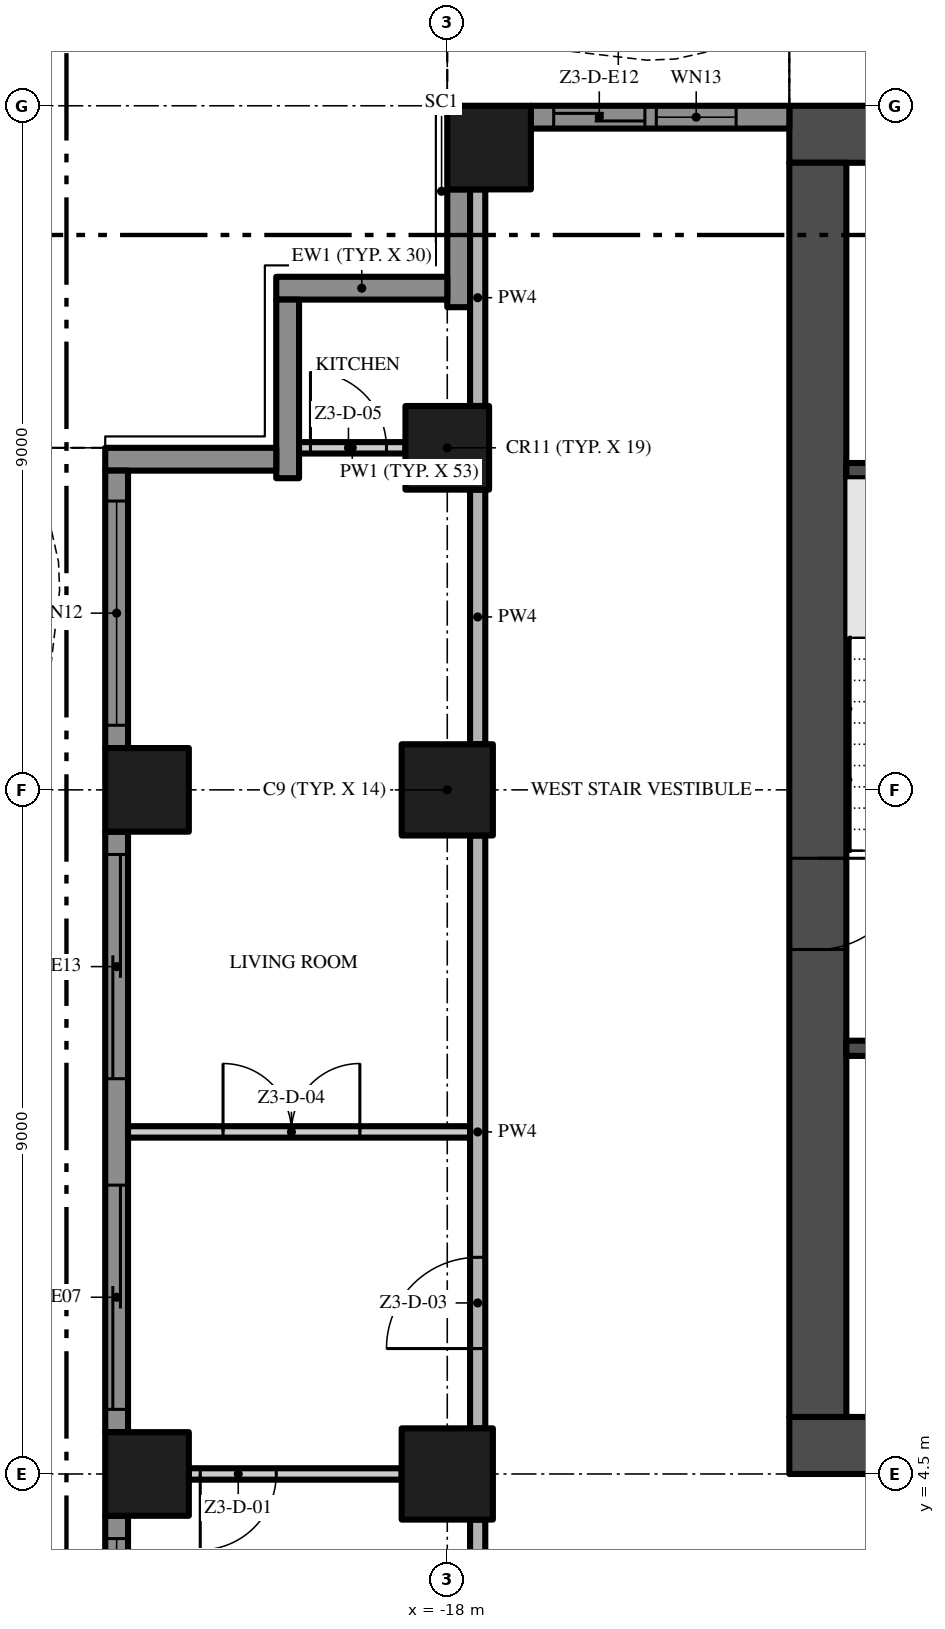
"""IFC4 building model, lengths in metres.
Left out: names, types, materials, properties, quantities, classifications, styles, units other than length and angle.
Written with IfcOpenShell. Run it as: python <this file> out.ifc"""

import sys

from ifc_helpers import new_model, si_unit, direction, frame, frame_2d, origin, origin_2d, place, context, subcontext, project, spatial, polyline, rectangle, outline, extrude, element, fill, save


model = new_model("IFC4")
c1 = context("Model", 3, precision=1e-05, world=origin(), true_north=direction((0.0, 1.0)))
c2 = subcontext(c1, "Body", "Model", "MODEL_VIEW")
j1 = project(units=[si_unit("LENGTHUNIT", "METRE"), si_unit("PLANEANGLEUNIT", "RADIAN")], contexts=[c1])
p1 = place(None, origin())
s1 = spatial("IfcSite", under=j1, at=p1, CompositionType="ELEMENT")
p2 = place(p1, origin())
s2 = spatial("IfcBuilding", under=s1, at=p2, CompositionType="ELEMENT")
p3 = place(p2, frame((0.0, 0.0, 163.0)))
s3 = spatial("IfcBuildingStorey", under=s2, at=p3, CompositionType="ELEMENT", Elevation=163.0)
p4 = place(p3, frame((-13.5, 4.875, -0.3), z_axis=(0.0, 0.0, 1.0), x_axis=(1.0, 0.0, 0.0)))
e1 = element("IfcWall", 1, at=p4, inside=s3, PredefinedType="SHEAR", context=c2, shape_type="SweptSolid", body=[
    extrude(rectangle(XDim=27.0, YDim=0.75, at=frame_2d((13.5, 0.0))), origin(), (0.0, 0.0, 1.0), 3.8),
])
p5 = place(p4, frame((12.0, 0.0, 0.3)))
e2 = element("IfcOpeningElement", 2, at=p5, cuts=e1, PredefinedType="OPENING", context=c2, shape_type="SweptSolid", body=[
    extrude(rectangle(XDim=3.0, YDim=2.4, at=frame_2d((1.5, 1.2))), frame((0.0, 0.385, 0.0), z_axis=(0.0, -1.0, 0.0), x_axis=(1.0, 0.0, 0.0)), (0.0, 0.0, 1.0), 0.77),
])
p6 = place(p4, frame((4.9, 0.0, 0.3)))
e3 = element("IfcOpeningElement", 3, at=p6, cuts=e1, PredefinedType="OPENING", context=c2, shape_type="SweptSolid", body=[
    extrude(rectangle(XDim=1.2, YDim=2.2, at=frame_2d((0.6, 1.1))), frame((0.0, 0.385, 0.0), z_axis=(0.0, -1.0, 0.0), x_axis=(1.0, 0.0, 0.0)), (0.0, 0.0, 1.0), 0.77),
])
p7 = place(p4, frame((20.75, 0.0, 0.3)))
e4 = element("IfcOpeningElement", 4, at=p7, cuts=e1, PredefinedType="OPENING", context=c2, shape_type="SweptSolid", body=[
    extrude(rectangle(XDim=1.5, YDim=2.2, at=frame_2d((0.75, 1.1))), frame((0.0, 0.385, 0.0), z_axis=(0.0, -1.0, 0.0), x_axis=(1.0, 0.0, 0.0)), (0.0, 0.0, 1.0), 0.77),
])
p8 = place(p4, frame((17.4, 0.0, 0.3)))
e5 = element("IfcOpeningElement", 5, at=p8, cuts=e1, PredefinedType="OPENING", context=c2, shape_type="SweptSolid", body=[
    extrude(rectangle(XDim=1.2, YDim=2.2, at=frame_2d((0.6, 1.1))), frame((0.0, 0.385, 0.0), z_axis=(0.0, -1.0, 0.0), x_axis=(1.0, 0.0, 0.0)), (0.0, 0.0, 1.0), 0.77),
])
p9 = place(p3, frame((13.5, 22.125, -0.3), z_axis=(0.0, 0.0, 1.0), x_axis=(-1.0, 0.0, 0.0)))
e6 = element("IfcWall", 6, at=p9, inside=s3, PredefinedType="SHEAR", context=c2, shape_type="SweptSolid", body=[
    extrude(rectangle(XDim=27.0, YDim=0.75, at=frame_2d((13.5, 0.0))), origin(), (0.0, 0.0, 1.0), 3.8),
])
p10 = place(p3, frame((-13.125, 21.75, -0.3), z_axis=(0.0, 0.0, 1.0), x_axis=(0.0, -1.0, 0.0)))
e7 = element("IfcWall", 7, at=p10, inside=s3, PredefinedType="SHEAR", context=c2, shape_type="SweptSolid", body=[
    extrude(rectangle(XDim=16.5, YDim=0.75, at=frame_2d((8.25, 0.0))), origin(), (0.0, 0.0, 1.0), 3.8),
])
p11 = place(p10, frame((9.15, 0.0, 0.3)))
e8 = element("IfcOpeningElement", 8, at=p11, cuts=e7, PredefinedType="OPENING", context=c2, shape_type="SweptSolid", body=[
    extrude(rectangle(XDim=1.2, YDim=2.2, at=frame_2d((0.6, 1.1))), frame((0.0, 0.385, 0.0), z_axis=(0.0, -1.0, 0.0), x_axis=(1.0, 0.0, 0.0)), (0.0, 0.0, 1.0), 0.77),
])
p12 = place(p3, frame((-18.0, 13.5, 0.0), z_axis=(0.0, 0.0, 1.0), x_axis=(1.0, 0.0, 0.0)))
e9 = element("IfcColumn", 9, at=p12, inside=s3, PredefinedType="COLUMN", context=c2, shape_type="SweptSolid", body=[
    extrude(rectangle(XDim=1.2, YDim=1.2, at=origin_2d()), origin(), (0.0, 0.0, 1.0), 3.5),
])
p13 = place(p3, frame((-17.45, 21.95, 0.0), z_axis=(0.0, 0.0, 1.0), x_axis=(1.0, 0.0, 0.0)))
e10 = element("IfcColumn", 10, at=p13, inside=s3, PredefinedType="COLUMN", context=c2, shape_type="SweptSolid", body=[
    extrude(rectangle(XDim=1.1, YDim=1.1, at=origin_2d()), origin(), (0.0, 0.0, 1.0), 3.5),
])
p14 = place(p3, frame((-18.0, 4.5, 0.0), z_axis=(0.0, 0.0, 1.0), x_axis=(1.0, 0.0, 0.0)))
e11 = element("IfcColumn", 11, at=p14, inside=s3, PredefinedType="COLUMN", context=c2, shape_type="SweptSolid", body=[
    extrude(rectangle(XDim=1.2, YDim=1.2, at=origin_2d()), origin(), (0.0, 0.0, 1.0), 3.5),
])
for number, where, z_axis, x_axis in (
    (12, (-21.95, 13.5, 0.0), (0.0, 0.0, 1.0), (1.0, 0.0, 0.0)),
    (13, (-18.0, 18.0, 0.0), (0.0, 0.0, 1.0), (1.0, 0.0, 0.0)),
    (14, (-21.95, 4.5, 0.0), (0.0, 0.0, 1.0), (1.0, 0.0, 0.0)),
):
    element("IfcColumn", number, at=place(p3, frame(where, z_axis=z_axis, x_axis=x_axis)), inside=s3, PredefinedType="COLUMN", context=c2, shape_type="SweptSolid", body=[
        extrude(rectangle(XDim=1.1, YDim=1.1, at=origin_2d()), origin(), (0.0, 0.0, 1.0), 3.5),
    ])
p15 = place(p3, frame((-16.9, 22.35, 0.0), z_axis=(0.0, 0.0, 1.0), x_axis=(1.0, 0.0, 0.0)))
e15 = element("IfcWall", 15, at=p15, inside=s3, PredefinedType="SOLIDWALL", context=c2, shape_type="SweptSolid", body=[
    extrude(rectangle(XDim=3.4, YDim=0.3, at=frame_2d((1.7, 0.0))), origin(), (0.0, 0.0, 1.0), 3.5),
])
p16 = place(p15, frame((1.65, 0.0, 0.45)))
e16 = element("IfcOpeningElement", 16, at=p16, cuts=e15, PredefinedType="OPENING", context=c2, shape_type="SweptSolid", body=[
    extrude(rectangle(XDim=1.05, YDim=2.65, at=frame_2d((0.525, 1.325))), frame((0.0, 0.16, 0.0), z_axis=(0.0, -1.0, 0.0), x_axis=(1.0, 0.0, 0.0)), (0.0, 0.0, 1.0), 0.32),
])
p17 = place(p15, frame((0.3, 0.0, 0.0)))
e17 = element("IfcOpeningElement", 17, at=p17, cuts=e15, PredefinedType="OPENING", context=c2, shape_type="SweptSolid", body=[
    extrude(rectangle(XDim=1.2, YDim=2.4, at=frame_2d((0.6, 1.2))), frame((0.0, 0.16, 0.0), z_axis=(0.0, -1.0, 0.0), x_axis=(1.0, 0.0, 0.0)), (0.0, 0.0, 1.0), 0.32),
])
p18 = place(p3, frame((-17.85, 19.85, 0.0), z_axis=(0.0, 0.0, 1.0), x_axis=(0.0, 1.0, 0.0)))
e18 = element("IfcWall", 18, at=p18, inside=s3, PredefinedType="SOLIDWALL", context=c2, shape_type="SweptSolid", body=[
    extrude(rectangle(XDim=1.55, YDim=0.3, at=frame_2d((0.775, 0.0))), origin(), (0.0, 0.0, 1.0), 3.5),
])
p19 = place(p3, frame((-20.25, 20.1, 0.0), z_axis=(0.0, 0.0, 1.0), x_axis=(1.0, 0.0, 0.0)))
e19 = element("IfcWall", 19, at=p19, inside=s3, PredefinedType="SOLIDWALL", context=c2, shape_type="SweptSolid", body=[
    extrude(rectangle(XDim=2.25, YDim=0.3, at=frame_2d((1.125, 0.0))), origin(), (0.0, 0.0, 1.0), 3.5),
])
p20 = place(p3, frame((-20.1, 17.6, 0.0), z_axis=(0.0, 0.0, 1.0), x_axis=(0.0, 1.0, 0.0)))
e20 = element("IfcWall", 20, at=p20, inside=s3, PredefinedType="SOLIDWALL", context=c2, shape_type="SweptSolid", body=[
    extrude(rectangle(XDim=2.35, YDim=0.3, at=frame_2d((1.175, 0.0))), origin(), (0.0, 0.0, 1.0), 3.5),
])
p21 = place(p3, frame((-22.5, 17.85, 0.0), z_axis=(0.0, 0.0, 1.0), x_axis=(1.0, 0.0, 0.0)))
e21 = element("IfcWall", 21, at=p21, inside=s3, PredefinedType="SOLIDWALL", context=c2, shape_type="SweptSolid", body=[
    extrude(rectangle(XDim=2.25, YDim=0.3, at=frame_2d((1.125, 0.0))), origin(), (0.0, 0.0, 1.0), 3.5),
])
p22 = place(p3, frame((-22.35, 14.05, 0.0), z_axis=(0.0, 0.0, 1.0), x_axis=(0.0, 1.0, 0.0)))
e22 = element("IfcWall", 22, at=p22, inside=s3, PredefinedType="SOLIDWALL", context=c2, shape_type="SweptSolid", body=[
    extrude(rectangle(XDim=3.65, YDim=0.3, at=frame_2d((1.825, 0.0))), origin(), (0.0, 0.0, 1.0), 3.5),
])
p23 = place(p22, frame((0.3, 0.0, 0.45)))
e23 = element("IfcOpeningElement", 23, at=p23, cuts=e22, PredefinedType="OPENING", context=c2, shape_type="SweptSolid", body=[
    extrude(rectangle(XDim=2.95, YDim=2.65, at=frame_2d((1.475, 1.325))), frame((0.0, 0.16, 0.0), z_axis=(0.0, -1.0, 0.0), x_axis=(1.0, 0.0, 0.0)), (0.0, 0.0, 1.0), 0.32),
])
p24 = place(p3, frame((-22.35, 5.05, 0.0), z_axis=(0.0, 0.0, 1.0), x_axis=(0.0, 1.0, 0.0)))
e24 = element("IfcWall", 24, at=p24, inside=s3, PredefinedType="SOLIDWALL", context=c2, shape_type="SweptSolid", body=[
    extrude(rectangle(XDim=7.9, YDim=0.3, at=frame_2d((3.95, 0.0))), origin(), (0.0, 0.0, 1.0), 3.5),
])
p25 = place(p24, frame((4.65, 0.0, 0.0)))
e25 = element("IfcOpeningElement", 25, at=p25, cuts=e24, PredefinedType="OPENING", context=c2, shape_type="SweptSolid", body=[
    extrude(rectangle(XDim=2.95, YDim=2.4, at=frame_2d((1.475, 1.2))), frame((0.0, 0.16, 0.0), z_axis=(0.0, -1.0, 0.0), x_axis=(1.0, 0.0, 0.0)), (0.0, 0.0, 1.0), 0.32),
])
p26 = place(p24, frame((0.3, 0.0, 0.0)))
e26 = element("IfcOpeningElement", 26, at=p26, cuts=e24, PredefinedType="OPENING", context=c2, shape_type="SweptSolid", body=[
    extrude(rectangle(XDim=2.95, YDim=2.4, at=frame_2d((1.475, 1.2))), frame((0.0, 0.16, 0.0), z_axis=(0.0, -1.0, 0.0), x_axis=(1.0, 0.0, 0.0)), (0.0, 0.0, 1.0), 0.32),
])
p27 = place(p3, frame((-22.35, -3.95, 0.0), z_axis=(0.0, 0.0, 1.0), x_axis=(0.0, 1.0, 0.0)))
e27 = element("IfcWall", 27, at=p27, inside=s3, PredefinedType="SOLIDWALL", context=c2, shape_type="SweptSolid", body=[
    extrude(rectangle(XDim=7.9, YDim=0.3, at=frame_2d((3.95, 0.0))), origin(), (0.0, 0.0, 1.0), 3.5),
])
p28 = place(p27, frame((4.65, 0.0, 0.45)))
e28 = element("IfcOpeningElement", 28, at=p28, cuts=e27, PredefinedType="OPENING", context=c2, shape_type="SweptSolid", body=[
    extrude(rectangle(XDim=2.95, YDim=2.65, at=frame_2d((1.475, 1.325))), frame((0.0, 0.16, 0.0), z_axis=(0.0, -1.0, 0.0), x_axis=(1.0, 0.0, 0.0)), (0.0, 0.0, 1.0), 0.32),
])
p29 = place(p27, frame((0.3, 0.0, 0.45)))
e29 = element("IfcOpeningElement", 29, at=p29, cuts=e27, PredefinedType="OPENING", context=c2, shape_type="SweptSolid", body=[
    extrude(rectangle(XDim=2.95, YDim=2.65, at=frame_2d((1.475, 1.325))), frame((0.0, 0.16, 0.0), z_axis=(0.0, -1.0, 0.0), x_axis=(1.0, 0.0, 0.0)), (0.0, 0.0, 1.0), 0.32),
])
p30 = place(p3, origin())
e30 = element("IfcWall", 30, at=p30, inside=s3, PredefinedType="USERDEFINED", context=c2, shape_type="SweptSolid", body=[
    extrude(outline(polyline([(-13.5, 23.451), (-15.0, 23.115), (-15.375, 23.1), (-16.5, 23.231), (-18.0, 23.755), (-18.083, 23.519), (-16.556, 22.986), (-15.385, 22.849), (-14.967, 22.866), (-13.445, 23.208), (-13.5, 23.451)])), origin(), (0.0, 0.0, 1.0), 0.9),
])
p31 = place(p3, origin())
e31 = element("IfcWall", 31, at=p31, inside=s3, PredefinedType="USERDEFINED", context=c2, shape_type="SweptSolid", body=[
    extrude(outline(polyline([(-23.451, 18.0), (-23.115, 16.5), (-23.1, 16.125), (-23.231, 15.0), (-23.755, 13.5), (-24.488, 12.0), (-25.149, 10.5), (-25.485, 9.0), (-25.5, 8.625), (-25.369, 7.5), (-24.845, 6.0), (-24.112, 4.5), (-23.451, 3.0), (-23.115, 1.5), (-23.1, 1.125), (-23.231, 0.0), (-23.755, -1.5), (-24.488, -3.0), (-25.149, -4.5), (-25.485, -6.0), (-25.5, -6.375), (-25.369, -7.5), (-24.845, -9.0), (-24.112, -10.5), (-23.451, -12.0), (-23.115, -13.5), (-22.871, -13.445), (-23.213, -11.921), (-23.885, -10.395), (-24.614, -8.904), (-25.124, -7.444), (-25.249, -6.365), (-25.236, -6.033), (-24.91, -4.579), (-24.261, -3.105), (-23.524, -1.596), (-22.986, -0.056), (-22.849, 1.115), (-22.866, 1.533), (-23.213, 3.079), (-23.885, 4.605), (-24.614, 6.096), (-25.124, 7.556), (-25.249, 8.635), (-25.236, 8.967), (-24.91, 10.421), (-24.261, 11.895), (-23.524, 13.404), (-22.986, 14.944), (-22.849, 16.115), (-22.866, 16.533), (-23.208, 18.055), (-23.451, 18.0)])), origin(), (0.0, 0.0, 1.0), 0.9),
])
for number, where, z_axis, x_axis in (
    (32, (-12.75, 10.1, 0.0), (0.0, 0.0, 1.0), (1.0, 0.0, 0.0)),
    (33, (-12.75, 17.7, 0.0), (0.0, 0.0, 1.0), (1.0, 0.0, 0.0)),
):
    element("IfcWall", number, at=place(p3, frame(where, z_axis=z_axis, x_axis=x_axis)), inside=s3, PredefinedType="SHEAR", context=c2, shape_type="SweptSolid", body=[
        extrude(rectangle(XDim=3.1, YDim=0.2, at=frame_2d((1.55, 0.0))), origin(), (0.0, 0.0, 1.0), 3.5),
    ])
p32 = place(p3, frame((-18.6, 4.5, 0.0), z_axis=(0.0, 0.0, 1.0), x_axis=(-1.0, 0.0, 0.0)))
e34 = element("IfcWall", 34, at=p32, inside=s3, PredefinedType="PARTITIONING", context=c2, shape_type="SweptSolid", body=[
    extrude(rectangle(XDim=2.8, YDim=0.15, at=frame_2d((1.4, 0.0))), origin(), (0.0, 0.0, 1.0), 3.5),
])
p33 = place(p32, frame((1.65, 0.0, 0.0)))
e35 = element("IfcOpeningElement", 35, at=p33, cuts=e34, PredefinedType="OPENING", context=c2, shape_type="SweptSolid", body=[
    extrude(rectangle(XDim=1.0, YDim=2.4, at=frame_2d((0.5, 1.2))), frame((0.0, 0.085, 0.0), z_axis=(0.0, -1.0, 0.0), x_axis=(1.0, 0.0, 0.0)), (0.0, 0.0, 1.0), 0.17),
])
p34 = place(p3, frame((-22.2, 9.0, 0.0), z_axis=(0.0, 0.0, 1.0), x_axis=(1.0, 0.0, 0.0)))
e36 = element("IfcWall", 36, at=p34, inside=s3, PredefinedType="PARTITIONING", context=c2, shape_type="SweptSolid", body=[
    extrude(rectangle(XDim=4.5, YDim=0.15, at=frame_2d((2.25, 0.0))), origin(), (0.0, 0.0, 1.0), 3.5),
])
p35 = place(p34, frame((1.25, 0.0, 0.0)))
e37 = element("IfcOpeningElement", 37, at=p35, cuts=e36, PredefinedType="OPENING", context=c2, shape_type="SweptSolid", body=[
    extrude(rectangle(XDim=1.8, YDim=2.4, at=frame_2d((0.9, 1.2))), frame((0.0, 0.085, 0.0), z_axis=(0.0, -1.0, 0.0), x_axis=(1.0, 0.0, 0.0)), (0.0, 0.0, 1.0), 0.17),
])
p36 = place(p3, frame((-19.95, 18.0, 0.0), z_axis=(0.0, 0.0, 1.0), x_axis=(1.0, 0.0, 0.0)))
e38 = element("IfcWall", 38, at=p36, inside=s3, PredefinedType="PARTITIONING", context=c2, shape_type="SweptSolid", body=[
    extrude(rectangle(XDim=1.4, YDim=0.15, at=frame_2d((0.7, 0.0))), origin(), (0.0, 0.0, 1.0), 3.5),
])
p37 = place(p36, frame((0.15, 0.0, 0.0)))
e39 = element("IfcOpeningElement", 39, at=p37, cuts=e38, PredefinedType="OPENING", context=c2, shape_type="SweptSolid", body=[
    extrude(rectangle(XDim=1.0, YDim=2.4, at=frame_2d((0.5, 1.2))), frame((0.0, 0.085, 0.0), z_axis=(0.0, -1.0, 0.0), x_axis=(1.0, 0.0, 0.0)), (0.0, 0.0, 1.0), 0.17),
])
p38 = place(p3, frame((-17.6, -0.2, 0.0), z_axis=(0.0, 0.0, 1.0), x_axis=(0.0, 1.0, 0.0)))
e40 = element("IfcWall", 40, at=p38, inside=s3, PredefinedType="PARTITIONING", context=c2, shape_type="SweptSolid", body=[
    extrude(rectangle(XDim=4.1, YDim=0.2, at=frame_2d((2.05, 0.0))), origin(), (0.0, 0.0, 1.0), 3.5),
])
p39 = place(p3, frame((-17.6, 5.1, 0.0), z_axis=(0.0, 0.0, 1.0), x_axis=(0.0, 1.0, 0.0)))
e41 = element("IfcWall", 41, at=p39, inside=s3, PredefinedType="PARTITIONING", context=c2, shape_type="SweptSolid", body=[
    extrude(rectangle(XDim=7.8, YDim=0.2, at=frame_2d((3.9, 0.0))), origin(), (0.0, 0.0, 1.0), 3.5),
])
p40 = place(p39, frame((1.05, 0.0, 0.0)))
e42 = element("IfcOpeningElement", 42, at=p40, cuts=e41, PredefinedType="OPENING", context=c2, shape_type="SweptSolid", body=[
    extrude(rectangle(XDim=1.2, YDim=2.4, at=frame_2d((0.6, 1.2))), frame((0.0, 0.11, 0.0), z_axis=(0.0, -1.0, 0.0), x_axis=(1.0, 0.0, 0.0)), (0.0, 0.0, 1.0), 0.22),
])
p41 = place(p3, frame((-17.6, 14.1, 0.0), z_axis=(0.0, 0.0, 1.0), x_axis=(0.0, 1.0, 0.0)))
e43 = element("IfcWall", 43, at=p41, inside=s3, PredefinedType="PARTITIONING", context=c2, shape_type="SweptSolid", body=[
    extrude(rectangle(XDim=3.35, YDim=0.2, at=frame_2d((1.675, 0.0))), origin(), (0.0, 0.0, 1.0), 3.5),
])
p42 = place(p3, frame((-17.6, 18.55, 0.0), z_axis=(0.0, 0.0, 1.0), x_axis=(0.0, 1.0, 0.0)))
e44 = element("IfcWall", 44, at=p42, inside=s3, PredefinedType="PARTITIONING", context=c2, shape_type="SweptSolid", body=[
    extrude(rectangle(XDim=2.85, YDim=0.2, at=frame_2d((1.425, 0.0))), origin(), (0.0, 0.0, 1.0), 3.5),
])
p43 = place(p16, origin())
e45 = element("IfcWindow", 45, at=p43, inside=s3, PartitioningType="SINGLE_PANEL", PredefinedType="WINDOW", context=c2, shape_type="SweptSolid", body=[
    extrude(rectangle(XDim=1.05, YDim=2.65, at=frame_2d((0.525, 1.325))), frame((0.0, 0.03, 0.0), z_axis=(0.0, -1.0, 0.0), x_axis=(1.0, 0.0, 0.0)), (0.0, 0.0, 1.0), 0.06),
])
fill(e16, e45)
p44 = place(p17, origin())
e46 = element("IfcDoor", 46, at=p44, inside=s3, OperationType="SINGLE_SWING_LEFT", PredefinedType="DOOR", context=c2, shape_type="SweptSolid", body=[
    extrude(rectangle(XDim=1.2, YDim=2.4, at=frame_2d((0.6, 1.2))), frame((0.0, 0.025, 0.0), z_axis=(0.0, -1.0, 0.0), x_axis=(1.0, 0.0, 0.0)), (0.0, 0.0, 1.0), 0.05),
])
fill(e17, e46)
p45 = place(p23, origin())
e47 = element("IfcWindow", 47, at=p45, inside=s3, PartitioningType="SINGLE_PANEL", PredefinedType="WINDOW", context=c2, shape_type="SweptSolid", body=[
    extrude(rectangle(XDim=2.95, YDim=2.65, at=frame_2d((1.475, 1.325))), frame((0.0, 0.03, 0.0), z_axis=(0.0, -1.0, 0.0), x_axis=(1.0, 0.0, 0.0)), (0.0, 0.0, 1.0), 0.06),
])
fill(e23, e47)
p46 = place(p25, origin())
e48 = element("IfcDoor", 48, at=p46, inside=s3, OperationType="SINGLE_SWING_LEFT", PredefinedType="DOOR", context=c2, shape_type="SweptSolid", body=[
    extrude(rectangle(XDim=2.95, YDim=2.4, at=frame_2d((1.475, 1.2))), frame((0.0, 0.025, 0.0), z_axis=(0.0, -1.0, 0.0), x_axis=(1.0, 0.0, 0.0)), (0.0, 0.0, 1.0), 0.05),
])
fill(e25, e48)
p47 = place(p26, origin())
e49 = element("IfcDoor", 49, at=p47, inside=s3, OperationType="SINGLE_SWING_LEFT", PredefinedType="DOOR", context=c2, shape_type="SweptSolid", body=[
    extrude(rectangle(XDim=2.95, YDim=2.4, at=frame_2d((1.475, 1.2))), frame((0.0, 0.025, 0.0), z_axis=(0.0, -1.0, 0.0), x_axis=(1.0, 0.0, 0.0)), (0.0, 0.0, 1.0), 0.05),
])
fill(e26, e49)
p48 = place(p28, origin())
e50 = element("IfcWindow", 50, at=p48, inside=s3, PartitioningType="SINGLE_PANEL", PredefinedType="WINDOW", context=c2, shape_type="SweptSolid", body=[
    extrude(rectangle(XDim=2.95, YDim=2.65, at=frame_2d((1.475, 1.325))), frame((0.0, 0.03, 0.0), z_axis=(0.0, -1.0, 0.0), x_axis=(1.0, 0.0, 0.0)), (0.0, 0.0, 1.0), 0.06),
])
fill(e28, e50)
p49 = place(p11, frame((1.2, 0.0, 0.0), z_axis=(0.0, 0.0, 1.0), x_axis=(-1.0, 0.0, 0.0)))
e51 = element("IfcDoor", 51, at=p49, inside=s3, OperationType="SINGLE_SWING_RIGHT", PredefinedType="DOOR", context=c2, shape_type="SweptSolid", body=[
    extrude(rectangle(XDim=1.2, YDim=2.2, at=frame_2d((0.6, 1.1))), frame((0.0, 0.025, 0.0), z_axis=(0.0, -1.0, 0.0), x_axis=(1.0, 0.0, 0.0)), (0.0, 0.0, 1.0), 0.05),
])
fill(e8, e51)
p50 = place(p33, origin())
e52 = element("IfcDoor", 52, at=p50, inside=s3, OperationType="SINGLE_SWING_RIGHT", PredefinedType="DOOR", context=c2, shape_type="SweptSolid", body=[
    extrude(rectangle(XDim=1.0, YDim=2.4, at=frame_2d((0.5, 1.2))), frame((0.0, 0.025, 0.0), z_axis=(0.0, -1.0, 0.0), x_axis=(1.0, 0.0, 0.0)), (0.0, 0.0, 1.0), 0.05),
])
fill(e35, e52)
p51 = place(p40, origin())
e53 = element("IfcDoor", 53, at=p51, inside=s3, OperationType="SINGLE_SWING_LEFT", PredefinedType="DOOR", context=c2, shape_type="SweptSolid", body=[
    extrude(rectangle(XDim=1.2, YDim=2.4, at=frame_2d((0.6, 1.2))), frame((0.0, 0.025, 0.0), z_axis=(0.0, -1.0, 0.0), x_axis=(1.0, 0.0, 0.0)), (0.0, 0.0, 1.0), 0.05),
])
fill(e42, e53)
p52 = place(p35, origin())
e54 = element("IfcDoor", 54, at=p52, inside=s3, OperationType="DOUBLE_DOOR_SINGLE_SWING", PredefinedType="DOOR", context=c2, shape_type="SweptSolid", body=[
    extrude(rectangle(XDim=1.8, YDim=2.4, at=frame_2d((0.9, 1.2))), frame((0.0, 0.025, 0.0), z_axis=(0.0, -1.0, 0.0), x_axis=(1.0, 0.0, 0.0)), (0.0, 0.0, 1.0), 0.05),
])
fill(e37, e54)
p53 = place(p37, origin())
e55 = element("IfcDoor", 55, at=p53, inside=s3, OperationType="SINGLE_SWING_LEFT", PredefinedType="DOOR", context=c2, shape_type="SweptSolid", body=[
    extrude(rectangle(XDim=1.0, YDim=2.4, at=frame_2d((0.5, 1.2))), frame((0.0, 0.025, 0.0), z_axis=(0.0, -1.0, 0.0), x_axis=(1.0, 0.0, 0.0)), (0.0, 0.0, 1.0), 0.05),
])
fill(e39, e55)
save(model, sys.argv[1])
